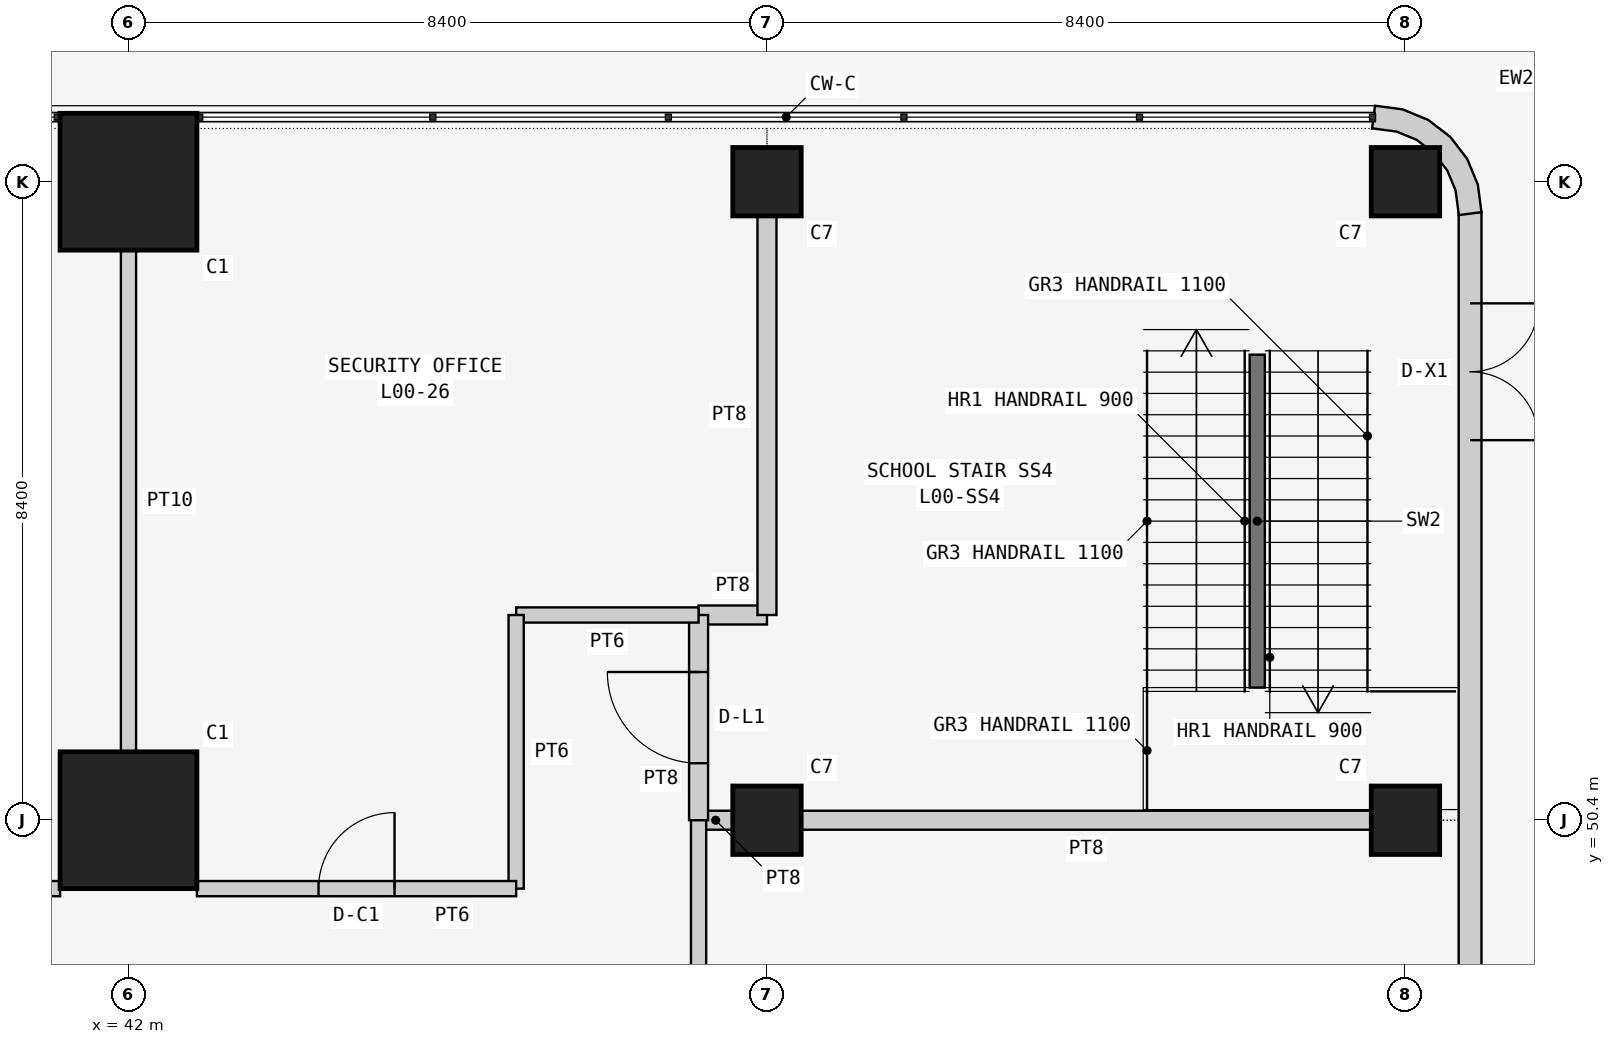
"""IFC4 building model, lengths in metres.
Left out: names, types, materials, properties, quantities, classifications, styles, units other than length and angle.
Written with IfcOpenShell. Run it as: python <this file> out.ifc"""

import sys

from ifc_helpers import new_model, si_unit, direction, frame, frame_2d, origin, origin_2d, place, context, subcontext, project, spatial, polyline, rectangle, outline, extrude, element, fill, save


model = new_model("IFC4")
c1 = context("Model", 3, precision=1e-05, world=origin(), true_north=direction((0.0, 1.0)))
c2 = subcontext(c1, "Body", "Model", "MODEL_VIEW")
j1 = project(units=[si_unit("LENGTHUNIT", "METRE"), si_unit("PLANEANGLEUNIT", "RADIAN")], contexts=[c1])
p1 = place(None, origin())
s1 = spatial("IfcSite", under=j1, at=p1, CompositionType="ELEMENT")
p2 = place(p1, origin())
s2 = spatial("IfcBuilding", under=s1, at=p2, CompositionType="ELEMENT")
p3 = place(p2, origin())
s3 = spatial("IfcBuildingStorey", under=s2, at=p3, CompositionType="ELEMENT", Elevation=0.0)
for number, where, z_axis, x_axis in (
    (1, (42.0, 50.4, 0.0), (0.0, 0.0, 1.0), (1.0, 0.0, 0.0)),
    (2, (42.0, 58.8, 0.0), (0.0, 0.0, 1.0), (1.0, 0.0, 0.0)),
):
    element("IfcColumn", number, at=place(p3, frame(where, z_axis=z_axis, x_axis=x_axis)), inside=s3, PredefinedType="COLUMN", context=c2, shape_type="SweptSolid", body=[
        extrude(rectangle(XDim=1.8, YDim=1.8, at=origin_2d()), origin(), (0.0, 0.0, 1.0), 6.0),
    ])
for number, where, z_axis, x_axis in (
    (3, (50.4, 50.4, 0.0), (0.0, 0.0, 1.0), (1.0, 0.0, 0.0)),
    (4, (50.4, 58.8, 0.0), (0.0, 0.0, 1.0), (1.0, 0.0, 0.0)),
    (5, (58.8, 50.4, 0.0), (0.0, 0.0, 1.0), (1.0, 0.0, 0.0)),
    (6, (58.8, 58.8, 0.0), (0.0, 0.0, 1.0), (1.0, 0.0, 0.0)),
):
    element("IfcColumn", number, at=place(p3, frame(where, z_axis=z_axis, x_axis=x_axis)), inside=s3, PredefinedType="COLUMN", context=c2, shape_type="SweptSolid", body=[
        extrude(rectangle(XDim=0.9, YDim=0.9, at=origin_2d()), origin(), (0.0, 0.0, 1.0), 6.0),
    ])
p4 = place(p3, frame((59.65, 25.2, 0.0), z_axis=(0.0, 0.0, 1.0), x_axis=(0.0, 1.0, 0.0)))
e7 = element("IfcWall", 7, at=p4, inside=s3, PredefinedType="SOLIDWALL", context=c2, shape_type="SweptSolid", body=[
    extrude(rectangle(XDim=33.2, YDim=0.3, at=frame_2d((16.6, 0.0))), origin(), (0.0, 0.0, 1.0), 5.8),
])
p5 = place(p4, frame((3.0, 0.0, 0.0)))
e8 = element("IfcOpeningElement", 8, at=p5, cuts=e7, PredefinedType="OPENING", context=c2, shape_type="SweptSolid", body=[
    extrude(rectangle(XDim=1.2, YDim=2.4, at=frame_2d((0.6, 1.2))), frame((0.0, 0.16, 0.0), z_axis=(0.0, -1.0, 0.0), x_axis=(1.0, 0.0, 0.0)), (0.0, 0.0, 1.0), 0.32),
])
p6 = place(p4, frame((20.4, 0.0, 0.0)))
e9 = element("IfcOpeningElement", 9, at=p6, cuts=e7, PredefinedType="OPENING", context=c2, shape_type="SweptSolid", body=[
    extrude(rectangle(XDim=1.2, YDim=2.4, at=frame_2d((0.6, 1.2))), frame((0.0, 0.16, 0.0), z_axis=(0.0, -1.0, 0.0), x_axis=(1.0, 0.0, 0.0)), (0.0, 0.0, 1.0), 0.32),
])
p7 = place(p4, frame((30.2, 0.0, 0.0)))
e10 = element("IfcOpeningElement", 10, at=p7, cuts=e7, PredefinedType="OPENING", context=c2, shape_type="SweptSolid", body=[
    extrude(rectangle(XDim=1.8, YDim=2.4, at=frame_2d((0.9, 1.2))), frame((0.0, 0.16, 0.0), z_axis=(0.0, -1.0, 0.0), x_axis=(1.0, 0.0, 0.0)), (0.0, 0.0, 1.0), 0.32),
])
p8 = place(p3, frame((59.648, 58.355, 0.0), z_axis=(0.0, 0.0, 1.0), x_axis=(0.707106781187, 0.707106781187, 0.0)))
e11 = element("IfcWall", 11, at=p8, inside=s3, PredefinedType="SOLIDWALL", context=c2, shape_type="SweptSolid", body=[
    extrude(outline(polyline([(0.139, 1.904), (-0.101, 1.72), (-0.087, 1.706), (0.1, 1.463), (0.209, 1.198), (0.246, 0.914), (0.209, 0.63), (0.1, 0.365), (-0.087, 0.122), (-0.101, 0.108), (0.139, -0.076), (0.362, 0.214), (0.502, 0.552), (0.549, 0.914), (0.502, 1.276), (0.362, 1.614), (0.139, 1.904)])), origin(), (0.0, 0.0, 1.0), 5.8),
])
p9 = place(p3, frame((49.95, 50.4, 0.0), z_axis=(0.0, 0.0, 1.0), x_axis=(-1.0, 0.0, 0.0)))
e12 = element("IfcWall", 12, at=p9, inside=s3, PredefinedType="SOLIDWALL", context=c2, shape_type="SweptSolid", body=[
    extrude(rectangle(XDim=0.45, YDim=0.25, at=frame_2d((0.225, 0.0))), origin(), (0.0, 0.0, 1.0), 5.043),
])
p10 = place(p3, frame((58.35, 50.4, 0.0), z_axis=(0.0, 0.0, 1.0), x_axis=(-1.0, 0.0, 0.0)))
e13 = element("IfcWall", 13, at=p10, inside=s3, PredefinedType="SOLIDWALL", context=c2, shape_type="SweptSolid", body=[
    extrude(rectangle(XDim=7.5, YDim=0.25, at=frame_2d((3.75, 0.0))), origin(), (0.0, 0.0, 1.0), 5.043),
])
p11 = place(p3, frame((49.5, 53.1, 0.0), z_axis=(0.0, 0.0, 1.0), x_axis=(1.0, 0.0, 0.0)))
e14 = element("IfcWall", 14, at=p11, inside=s3, PredefinedType="SOLIDWALL", context=c2, shape_type="SweptSolid", body=[
    extrude(rectangle(XDim=0.9, YDim=0.25, at=frame_2d((0.45, 0.0))), origin(), (0.0, 0.0, 1.0), 5.8),
])
p12 = place(p3, frame((50.4, 53.1, 0.0), z_axis=(0.0, 0.0, 1.0), x_axis=(0.0, 1.0, 0.0)))
e15 = element("IfcWall", 15, at=p12, inside=s3, PredefinedType="SOLIDWALL", context=c2, shape_type="SweptSolid", body=[
    extrude(rectangle(XDim=5.25, YDim=0.25, at=frame_2d((2.625, 0.0))), origin(), (0.0, 0.0, 1.0), 5.043),
])
p13 = place(p3, frame((49.5, 50.4, 0.0), z_axis=(0.0, 0.0, 1.0), x_axis=(0.0, 1.0, 0.0)))
e16 = element("IfcWall", 16, at=p13, inside=s3, PredefinedType="SOLIDWALL", context=c2, shape_type="SweptSolid", body=[
    extrude(rectangle(XDim=2.7, YDim=0.25, at=frame_2d((1.35, 0.0))), origin(), (0.0, 0.0, 1.0), 5.8),
])
p14 = place(p13, frame((0.75, 0.0, 0.0)))
e17 = element("IfcOpeningElement", 17, at=p14, cuts=e16, PredefinedType="OPENING", context=c2, shape_type="SweptSolid", body=[
    extrude(rectangle(XDim=1.2, YDim=2.1, at=frame_2d((0.6, 1.05))), frame((0.0, 0.135, 0.0), z_axis=(0.0, -1.0, 0.0), x_axis=(1.0, 0.0, 0.0)), (0.0, 0.0, 1.0), 0.27),
])
p15 = place(p3, frame((49.5, 42.9, 0.0), z_axis=(0.0, 0.0, 1.0), x_axis=(0.0, 1.0, 0.0)))
e18 = element("IfcWall", 18, at=p15, inside=s3, PredefinedType="PARTITIONING", context=c2, shape_type="SweptSolid", body=[
    extrude(rectangle(XDim=7.5, YDim=0.2, at=frame_2d((3.75, 0.0))), origin(), (0.0, 0.0, 1.0), 5.8),
])
p16 = place(p15, frame((3.25, 0.0, 0.0)))
e19 = element("IfcOpeningElement", 19, at=p16, cuts=e18, PredefinedType="OPENING", context=c2, shape_type="SweptSolid", body=[
    extrude(rectangle(XDim=1.0, YDim=2.1, at=frame_2d((0.5, 1.05))), frame((0.0, 0.11, 0.0), z_axis=(0.0, -1.0, 0.0), x_axis=(1.0, 0.0, 0.0)), (0.0, 0.0, 1.0), 0.22),
])
p17 = place(p3, frame((42.0, 57.9, 0.0), z_axis=(0.0, 0.0, 1.0), x_axis=(0.0, -1.0, 0.0)))
e20 = element("IfcWall", 20, at=p17, inside=s3, PredefinedType="SOLIDWALL", context=c2, shape_type="SweptSolid", body=[
    extrude(rectangle(XDim=6.6, YDim=0.2, at=frame_2d((3.3, 0.0))), origin(), (0.0, 0.0, 1.0), 5.043),
])
p18 = place(p3, frame((41.1, 49.5, 0.0), z_axis=(0.0, 0.0, 1.0), x_axis=(-1.0, 0.0, 0.0)))
e21 = element("IfcWall", 21, at=p18, inside=s3, PredefinedType="SOLIDWALL", context=c2, shape_type="SweptSolid", body=[
    extrude(rectangle(XDim=6.6, YDim=0.2, at=frame_2d((3.3, 0.0))), origin(), (0.0, 0.0, 1.0), 5.8),
])
p19 = place(p18, frame((2.8, 0.0, 0.0)))
e22 = element("IfcOpeningElement", 22, at=p19, cuts=e21, PredefinedType="OPENING", context=c2, shape_type="SweptSolid", body=[
    extrude(rectangle(XDim=1.0, YDim=2.1, at=frame_2d((0.5, 1.05))), frame((0.0, 0.11, 0.0), z_axis=(0.0, -1.0, 0.0), x_axis=(1.0, 0.0, 0.0)), (0.0, 0.0, 1.0), 0.22),
])
p20 = place(p3, frame((49.5, 53.1, 0.0), z_axis=(0.0, 0.0, 1.0), x_axis=(-1.0, 0.0, 0.0)))
e23 = element("IfcWall", 23, at=p20, inside=s3, PredefinedType="PARTITIONING", context=c2, shape_type="SweptSolid", body=[
    extrude(rectangle(XDim=2.4, YDim=0.2, at=frame_2d((1.2, 0.0))), origin(), (0.0, 0.0, 1.0), 5.8),
])
p21 = place(p3, frame((47.1, 53.1, 0.0), z_axis=(0.0, 0.0, 1.0), x_axis=(0.0, -1.0, 0.0)))
e24 = element("IfcWall", 24, at=p21, inside=s3, PredefinedType="PARTITIONING", context=c2, shape_type="SweptSolid", body=[
    extrude(rectangle(XDim=3.6, YDim=0.2, at=frame_2d((1.8, 0.0))), origin(), (0.0, 0.0, 1.0), 5.8),
])
p22 = place(p3, frame((47.1, 49.5, 0.0), z_axis=(0.0, 0.0, 1.0), x_axis=(-1.0, 0.0, 0.0)))
e25 = element("IfcWall", 25, at=p22, inside=s3, PredefinedType="PARTITIONING", context=c2, shape_type="SweptSolid", body=[
    extrude(rectangle(XDim=4.2, YDim=0.2, at=frame_2d((2.1, 0.0))), origin(), (0.0, 0.0, 1.0), 5.8),
])
p23 = place(p22, frame((1.6, 0.0, 0.0)))
e26 = element("IfcOpeningElement", 26, at=p23, cuts=e25, PredefinedType="OPENING", context=c2, shape_type="SweptSolid", body=[
    extrude(rectangle(XDim=1.0, YDim=2.1, at=frame_2d((0.5, 1.05))), frame((0.0, 0.11, 0.0), z_axis=(0.0, -1.0, 0.0), x_axis=(1.0, 0.0, 0.0)), (0.0, 0.0, 1.0), 0.22),
])
p24 = place(p3, frame((56.85, 56.525, 0.0), z_axis=(0.0, 0.0, 1.0), x_axis=(0.0, -1.0, 0.0)))
e27 = element("IfcWall", 27, at=p24, inside=s3, PredefinedType="SOLIDWALL", context=c2, shape_type="SweptSolid", body=[
    extrude(rectangle(XDim=4.38, YDim=0.2, at=frame_2d((2.19, 0.0))), origin(), (0.0, 0.0, 1.0), 6.0),
])
p25 = place(p7, frame((1.8, 0.0, 0.0), z_axis=(0.0, 0.0, 1.0), x_axis=(-1.0, 0.0, 0.0)))
e28 = element("IfcDoor", 28, at=p25, inside=s3, OperationType="DOUBLE_DOOR_SINGLE_SWING", PredefinedType="DOOR", context=c2, shape_type="SweptSolid", body=[
    extrude(rectangle(XDim=1.8, YDim=2.4, at=frame_2d((0.9, 1.2))), frame((0.0, 0.025, 0.0), z_axis=(0.0, -1.0, 0.0), x_axis=(1.0, 0.0, 0.0)), (0.0, 0.0, 1.0), 0.05),
])
fill(e10, e28)
p26 = place(p14, origin())
e29 = element("IfcDoor", 29, at=p26, inside=s3, OperationType="SINGLE_SWING_RIGHT", PredefinedType="DOOR", context=c2, shape_type="SweptSolid", body=[
    extrude(rectangle(XDim=1.2, YDim=2.1, at=frame_2d((0.6, 1.05))), frame((0.0, 0.025, 0.0), z_axis=(0.0, -1.0, 0.0), x_axis=(1.0, 0.0, 0.0)), (0.0, 0.0, 1.0), 0.05),
])
fill(e17, e29)
p27 = place(p23, frame((1.0, 0.0, 0.0), z_axis=(0.0, 0.0, 1.0), x_axis=(-1.0, 0.0, 0.0)))
e30 = element("IfcDoor", 30, at=p27, inside=s3, OperationType="SINGLE_SWING_RIGHT", PredefinedType="DOOR", context=c2, shape_type="SweptSolid", body=[
    extrude(rectangle(XDim=1.0, YDim=2.1, at=frame_2d((0.5, 1.05))), frame((0.0, 0.025, 0.0), z_axis=(0.0, -1.0, 0.0), x_axis=(1.0, 0.0, 0.0)), (0.0, 0.0, 1.0), 0.05),
])
fill(e26, e30)
save(model, sys.argv[1])
